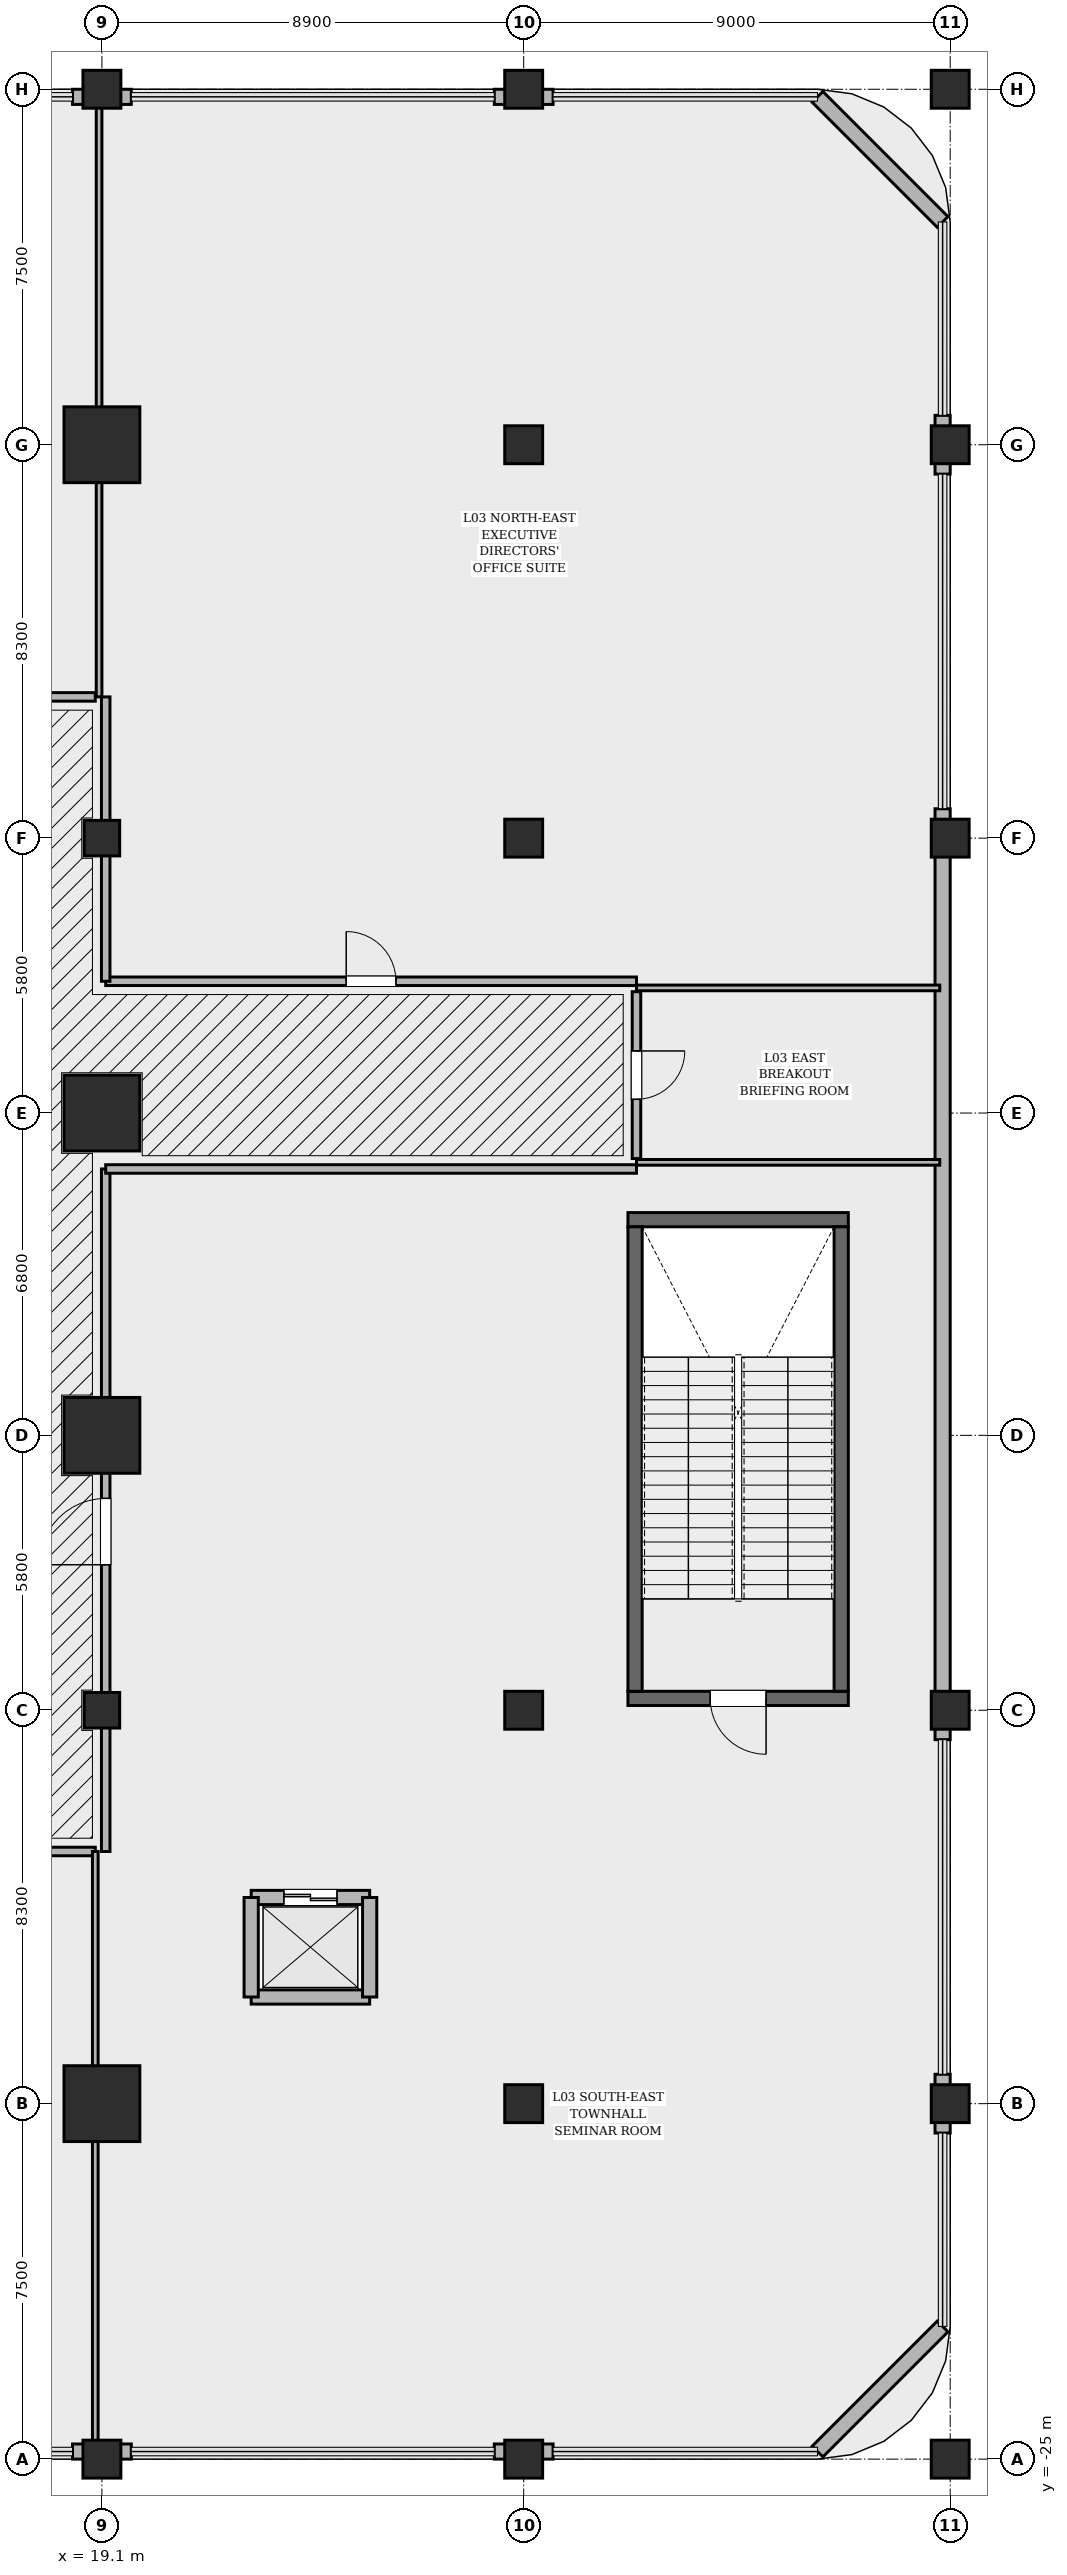
"""IFC4 building model, lengths in metres.
Left out: names, types, materials, properties, quantities, classifications, styles, units other than length and angle.
Written with IfcOpenShell. Run it as: python <this file> out.ifc"""

import sys

from ifc_helpers import new_model, si_unit, direction, frame, frame_2d, origin, origin_2d, place, context, subcontext, project, spatial, rectangle, hollow_rectangle, circle, extrude, element, fill, save


model = new_model("IFC4")
c1 = context("Model", 3, precision=1e-05, world=origin(), true_north=direction((0.0, 1.0)))
c2 = subcontext(c1, "Body", "Model", "MODEL_VIEW")
j1 = project(units=[si_unit("LENGTHUNIT", "METRE"), si_unit("PLANEANGLEUNIT", "RADIAN")], contexts=[c1])
p1 = place(None, origin())
s1 = spatial("IfcSite", under=j1, at=p1, CompositionType="ELEMENT")
p2 = place(p1, origin())
s2 = spatial("IfcBuilding", under=s1, at=p2, CompositionType="ELEMENT")
p3 = place(p2, frame((0.0, 0.0, 16.8)))
s3 = spatial("IfcBuildingStorey", under=s2, at=p3, CompositionType="ELEMENT", Elevation=16.8)
p4 = place(p3, frame((30.2, -8.95, 0.0), z_axis=(0.0, 0.0, 1.0), x_axis=(1.0, 0.0, 0.0)))
e1 = element("IfcWall", 1, at=p4, inside=s3, PredefinedType="SOLIDWALL", context=c2, shape_type="SweptSolid", body=[
    extrude(rectangle(XDim=4.65, YDim=0.3, at=frame_2d((2.325, 0.0))), origin(), (0.0, 0.0, 1.0), 5.4),
])
p5 = place(p4, frame((1.735, 0.0, 0.0)))
e2 = element("IfcOpeningElement", 2, at=p5, cuts=e1, PredefinedType="OPENING", context=c2, shape_type="SweptSolid", body=[
    extrude(rectangle(XDim=1.18, YDim=2.2, at=frame_2d((0.59, 1.1))), frame((0.0, 0.16, 0.0), z_axis=(0.0, -1.0, 0.0), x_axis=(1.0, 0.0, 0.0)), (0.0, 0.0, 1.0), 0.32),
])
p6 = place(p3, frame((34.85, 1.15, 0.0), z_axis=(0.0, 0.0, 1.0), x_axis=(-1.0, 0.0, 0.0)))
e3 = element("IfcWall", 3, at=p6, inside=s3, PredefinedType="SOLIDWALL", context=c2, shape_type="SweptSolid", body=[
    extrude(rectangle(XDim=4.65, YDim=0.3, at=frame_2d((2.325, 0.0))), origin(), (0.0, 0.0, 1.0), 5.4),
])
for number, where, z_axis, x_axis in (
    (4, (30.35, -8.8, 0.0), (0.0, 0.0, 1.0), (0.0, 1.0, 0.0)),
    (5, (34.7, 1.0, 0.0), (0.0, 0.0, 1.0), (0.0, -1.0, 0.0)),
):
    element("IfcWall", number, at=place(p3, frame(where, z_axis=z_axis, x_axis=x_axis)), inside=s3, PredefinedType="SOLIDWALL", context=c2, shape_type="SweptSolid", body=[
        extrude(rectangle(XDim=9.8, YDim=0.3, at=frame_2d((4.9, 0.0))), origin(), (0.0, 0.0, 1.0), 5.4),
    ])
for number, where, z_axis, x_axis in (
    (6, (19.1, -17.5, 0.0), (0.0, 0.0, 1.0), (1.0, 0.0, 0.0)),
    (7, (19.1, -3.4, 0.0), (0.0, 0.0, 1.0), (1.0, 0.0, 0.0)),
    (8, (19.1, 3.4, 0.0), (0.0, 0.0, 1.0), (1.0, 0.0, 0.0)),
    (9, (19.1, 17.5, 0.0), (0.0, 0.0, 1.0), (1.0, 0.0, 0.0)),
):
    element("IfcColumn", number, at=place(p3, frame(where, z_axis=z_axis, x_axis=x_axis)), inside=s3, PredefinedType="COLUMN", context=c2, shape_type="SweptSolid", body=[
        extrude(hollow_rectangle(XDim=1.6, YDim=1.6, WallThickness=0.05, at=origin_2d()), origin(), (0.0, 0.0, 1.0), 5.4),
    ])
for number, where, z_axis, x_axis in (
    (10, (19.1, -25.0, 0.0), (0.0, 0.0, 1.0), (1.0, 0.0, 0.0)),
    (11, (28.0, -25.0, 0.0), (0.0, 0.0, 1.0), (1.0, 0.0, 0.0)),
    (12, (37.0, -25.0, 0.0), (0.0, 0.0, 1.0), (1.0, 0.0, 0.0)),
    (13, (28.0, -17.5, 0.0), (0.0, 0.0, 1.0), (1.0, 0.0, 0.0)),
    (14, (37.0, -17.5, 0.0), (0.0, 0.0, 1.0), (1.0, 0.0, 0.0)),
    (15, (37.0, -9.2, 0.0), (0.0, 0.0, 1.0), (1.0, 0.0, 0.0)),
    (16, (37.0, 9.2, 0.0), (0.0, 0.0, 1.0), (1.0, 0.0, 0.0)),
    (17, (28.0, 17.5, 0.0), (0.0, 0.0, 1.0), (1.0, 0.0, 0.0)),
    (18, (37.0, 17.5, 0.0), (0.0, 0.0, 1.0), (1.0, 0.0, 0.0)),
    (19, (19.1, 25.0, 0.0), (0.0, 0.0, 1.0), (1.0, 0.0, 0.0)),
    (20, (28.0, 25.0, 0.0), (0.0, 0.0, 1.0), (1.0, 0.0, 0.0)),
    (21, (37.0, 25.0, 0.0), (0.0, 0.0, 1.0), (1.0, 0.0, 0.0)),
    (22, (28.0, -9.2, 0.0), (0.0, 0.0, 1.0), (1.0, 0.0, 0.0)),
    (23, (28.0, 9.2, 0.0), (0.0, 0.0, 1.0), (1.0, 0.0, 0.0)),
):
    element("IfcColumn", number, at=place(p3, frame(where, z_axis=z_axis, x_axis=x_axis)), inside=s3, PredefinedType="COLUMN", context=c2, shape_type="SweptSolid", body=[
        extrude(rectangle(XDim=0.8, YDim=0.8, at=origin_2d()), origin(), (0.0, 0.0, 1.0), 5.4),
    ])
for number, where, z_axis, x_axis in (
    (24, (19.1, -9.2, 0.0), (0.0, 0.0, 1.0), (1.0, 0.0, 0.0)),
    (25, (19.1, 9.2, 0.0), (0.0, 0.0, 1.0), (1.0, 0.0, 0.0)),
):
    element("IfcColumn", number, at=place(p3, frame(where, z_axis=z_axis, x_axis=x_axis)), inside=s3, PredefinedType="PILASTER", context=c2, shape_type="SweptSolid", body=[
        extrude(circle(Radius=0.375, at=origin_2d()), origin(), (0.0, 0.0, 1.0), 5.4),
    ])
for number, where, z_axis, x_axis in (
    (26, (18.48, -24.84, 0.0), (0.0, 0.0, 1.0), (1.0, 0.0, 0.0)),
    (27, (19.72, 24.84, 0.0), (0.0, 0.0, 1.0), (-1.0, 0.0, 0.0)),
):
    element("IfcWall", number, at=place(p3, frame(where, z_axis=z_axis, x_axis=x_axis)), inside=s3, PredefinedType="SOLIDWALL", context=c2, shape_type="SweptSolid", body=[
        extrude(rectangle(XDim=1.24, YDim=0.32, at=frame_2d((0.62, 0.0))), origin(), (0.0, 0.0, 1.0), 4.314),
    ])
for number, where, z_axis, x_axis in (
    (28, (27.38, -24.84, 0.0), (0.0, 0.0, 1.0), (1.0, 0.0, 0.0)),
    (29, (28.62, 24.84, 0.0), (0.0, 0.0, 1.0), (-1.0, 0.0, 0.0)),
):
    element("IfcWall", number, at=place(p3, frame(where, z_axis=z_axis, x_axis=x_axis)), inside=s3, PredefinedType="SOLIDWALL", context=c2, shape_type="SweptSolid", body=[
        extrude(rectangle(XDim=1.24, YDim=0.32, at=frame_2d((0.62, 0.0))), origin(), (0.0, 0.0, 1.0), 4.314),
    ])
p7 = place(p3, frame((36.84, 9.82, 0.0), z_axis=(0.0, 0.0, 1.0), x_axis=(0.0, -1.0, 0.0)))
e30 = element("IfcWall", 30, at=p7, inside=s3, PredefinedType="SOLIDWALL", context=c2, shape_type="SweptSolid", body=[
    extrude(rectangle(XDim=19.64, YDim=0.32, at=frame_2d((9.82, 0.0))), origin(), (0.0, 0.0, 1.0), 4.314),
])
for number, where, z_axis, x_axis in (
    (31, (36.84, -16.88, 0.0), (0.0, 0.0, 1.0), (0.0, -1.0, 0.0)),
    (32, (36.84, 18.12, 0.0), (0.0, 0.0, 1.0), (0.0, -1.0, 0.0)),
):
    element("IfcWall", number, at=place(p3, frame(where, z_axis=z_axis, x_axis=x_axis)), inside=s3, PredefinedType="SOLIDWALL", context=c2, shape_type="SweptSolid", body=[
        extrude(rectangle(XDim=1.24, YDim=0.32, at=frame_2d((0.62, 0.0))), origin(), (0.0, 0.0, 1.0), 4.314),
    ])
for number, where, z_axis, x_axis in (
    (33, (34.2, 24.84, 0.0), (0.0, 0.0, 1.0), (0.707, -0.707, 0.0)),
    (34, (36.84, -22.2, 0.0), (0.0, 0.0, 1.0), (-0.707, -0.707, 0.0)),
):
    element("IfcWall", number, at=place(p3, frame(where, z_axis=z_axis, x_axis=x_axis)), inside=s3, PredefinedType="SOLIDWALL", context=c2, shape_type="SweptSolid", body=[
        extrude(rectangle(XDim=3.734, YDim=0.32, at=frame_2d((1.867, 0.0))), origin(), (0.0, 0.0, 1.0), 4.464),
    ])
p8 = place(p3, frame((22.25, -13.15, 0.0), z_axis=(0.0, 0.0, 1.0), x_axis=(1.0, 0.0, 0.0)))
e35 = element("IfcWall", 35, at=p8, inside=s3, PredefinedType="SOLIDWALL", context=c2, shape_type="SweptSolid", body=[
    extrude(rectangle(XDim=2.5, YDim=0.3, at=frame_2d((1.25, 0.0))), origin(), (0.0, 0.0, 1.0), 5.02),
])
p9 = place(p8, frame((0.69, 0.0, 0.0)))
e36 = element("IfcOpeningElement", 36, at=p9, cuts=e35, PredefinedType="OPENING", context=c2, shape_type="SweptSolid", body=[
    extrude(rectangle(XDim=1.12, YDim=2.25, at=frame_2d((0.56, 1.125))), frame((0.0, 0.16, 0.0), z_axis=(0.0, -1.0, 0.0), x_axis=(1.0, 0.0, 0.0)), (0.0, 0.0, 1.0), 0.32),
])
p10 = place(p3, frame((22.25, -15.25, 0.0), z_axis=(0.0, 0.0, 1.0), x_axis=(1.0, 0.0, 0.0)))
e37 = element("IfcWall", 37, at=p10, inside=s3, PredefinedType="SOLIDWALL", context=c2, shape_type="SweptSolid", body=[
    extrude(rectangle(XDim=2.5, YDim=0.3, at=frame_2d((1.25, 0.0))), origin(), (0.0, 0.0, 1.0), 5.02),
])
for number, where, z_axis, x_axis in (
    (38, (22.25, -15.25, 0.0), (0.0, 0.0, 1.0), (0.0, 1.0, 0.0)),
    (39, (24.75, -15.25, 0.0), (0.0, 0.0, 1.0), (0.0, 1.0, 0.0)),
):
    element("IfcWall", number, at=place(p3, frame(where, z_axis=z_axis, x_axis=x_axis)), inside=s3, PredefinedType="SOLIDWALL", context=c2, shape_type="SweptSolid", body=[
        extrude(rectangle(XDim=2.1, YDim=0.3, at=frame_2d((1.05, 0.0))), origin(), (0.0, 0.0, 1.0), 5.02),
    ])
p11 = place(p3, frame((-18.96, -12.18, 0.0), z_axis=(0.0, 0.0, 1.0), x_axis=(1.0, 0.0, 0.0)))
e40 = element("IfcWall", 40, at=p11, inside=s3, PredefinedType="PARTITIONING", context=c2, shape_type="SweptSolid", body=[
    extrude(rectangle(XDim=37.92, YDim=0.18, at=frame_2d((18.96, 0.0))), origin(), (0.0, 0.0, 1.0), 4.314),
])
p12 = place(p11, frame((18.435, 0.0, 0.0)))
e41 = element("IfcOpeningElement", 41, at=p12, cuts=e40, PredefinedType="OPENING", context=c2, shape_type="SweptSolid", body=[
    extrude(rectangle(XDim=1.05, YDim=2.2, at=frame_2d((0.525, 1.1))), frame((0.0, 0.1, 0.0), z_axis=(0.0, -1.0, 0.0), x_axis=(1.0, 0.0, 0.0)), (0.0, 0.0, 1.0), 0.2),
])
p13 = place(p3, frame((18.96, -12.18, 0.0), z_axis=(0.0, 0.0, 1.0), x_axis=(0.0, -1.0, 0.0)))
e42 = element("IfcWall", 42, at=p13, inside=s3, PredefinedType="PARTITIONING", context=c2, shape_type="SweptSolid", body=[
    extrude(rectangle(XDim=12.6, YDim=0.12, at=frame_2d((6.3, 0.0))), origin(), (0.0, 0.0, 1.0), 4.314),
])
p14 = place(p3, frame((19.18, -12.18, 0.0), z_axis=(0.0, 0.0, 1.0), x_axis=(0.0, 1.0, 0.0)))
e43 = element("IfcWall", 43, at=p14, inside=s3, PredefinedType="PARTITIONING", context=c2, shape_type="SweptSolid", body=[
    extrude(rectangle(XDim=14.4, YDim=0.18, at=frame_2d((7.2, 0.0))), origin(), (0.0, 0.0, 1.0), 4.314),
])
p15 = place(p14, frame((6.05, 0.0, 0.0)))
e44 = element("IfcOpeningElement", 44, at=p15, cuts=e43, PredefinedType="OPENING", context=c2, shape_type="SweptSolid", body=[
    extrude(rectangle(XDim=1.4, YDim=2.25, at=frame_2d((0.7, 1.125))), frame((0.0, 0.1, 0.0), z_axis=(0.0, -1.0, 0.0), x_axis=(1.0, 0.0, 0.0)), (0.0, 0.0, 1.0), 0.2),
])
p16 = place(p3, frame((19.18, 2.22, 0.0), z_axis=(0.0, 0.0, 1.0), x_axis=(1.0, 0.0, 0.0)))
e45 = element("IfcWall", 45, at=p16, inside=s3, PredefinedType="PARTITIONING", context=c2, shape_type="SweptSolid", body=[
    extrude(rectangle(XDim=11.2, YDim=0.18, at=frame_2d((5.6, 0.0))), origin(), (0.0, 0.0, 1.0), 4.314),
])
for number, where, z_axis, x_axis in (
    (46, (30.38, 2.36, 0.0), (0.0, 0.0, 1.0), (1.0, 0.0, 0.0)),
    (47, (36.78, 6.04, 0.0), (0.0, 0.0, 1.0), (-1.0, 0.0, 0.0)),
):
    element("IfcWall", number, at=place(p3, frame(where, z_axis=z_axis, x_axis=x_axis)), inside=s3, PredefinedType="PARTITIONING", context=c2, shape_type="SweptSolid", body=[
        extrude(rectangle(XDim=6.4, YDim=0.12, at=frame_2d((3.2, 0.0))), origin(), (0.0, 0.0, 1.0), 5.02),
    ])
p17 = place(p3, frame((30.38, 6.18, 0.0), z_axis=(0.0, 0.0, 1.0), x_axis=(-1.0, 0.0, 0.0)))
e48 = element("IfcWall", 48, at=p17, inside=s3, PredefinedType="PARTITIONING", context=c2, shape_type="SweptSolid", body=[
    extrude(rectangle(XDim=11.2, YDim=0.18, at=frame_2d((5.6, 0.0))), origin(), (0.0, 0.0, 1.0), 4.314),
])
p18 = place(p17, frame((5.075, 0.0, 0.0)))
e49 = element("IfcOpeningElement", 49, at=p18, cuts=e48, PredefinedType="OPENING", context=c2, shape_type="SweptSolid", body=[
    extrude(rectangle(XDim=1.05, YDim=2.2, at=frame_2d((0.525, 1.1))), frame((0.0, 0.1, 0.0), z_axis=(0.0, -1.0, 0.0), x_axis=(1.0, 0.0, 0.0)), (0.0, 0.0, 1.0), 0.2),
])
p19 = place(p3, frame((19.18, 6.18, 0.0), z_axis=(0.0, 0.0, 1.0), x_axis=(0.0, 1.0, 0.0)))
e50 = element("IfcWall", 50, at=p19, inside=s3, PredefinedType="PARTITIONING", context=c2, shape_type="SweptSolid", body=[
    extrude(rectangle(XDim=6.0, YDim=0.18, at=frame_2d((3.0, 0.0))), origin(), (0.0, 0.0, 1.0), 4.314),
])
p20 = place(p3, frame((19.04, 12.18, 0.0), z_axis=(0.0, 0.0, 1.0), x_axis=(0.0, 1.0, 0.0)))
e51 = element("IfcWall", 51, at=p20, inside=s3, PredefinedType="PARTITIONING", context=c2, shape_type="SweptSolid", body=[
    extrude(rectangle(XDim=12.6, YDim=0.12, at=frame_2d((6.3, 0.0))), origin(), (0.0, 0.0, 1.0), 4.314),
])
p21 = place(p3, frame((18.96, 12.18, 0.0), z_axis=(0.0, 0.0, 1.0), x_axis=(-1.0, 0.0, 0.0)))
e52 = element("IfcWall", 52, at=p21, inside=s3, PredefinedType="PARTITIONING", context=c2, shape_type="SweptSolid", body=[
    extrude(rectangle(XDim=16.78, YDim=0.18, at=frame_2d((8.39, 0.0))), origin(), (0.0, 0.0, 1.0), 4.314),
])
p22 = place(p21, frame((7.865, 0.0, 0.0)))
e53 = element("IfcOpeningElement", 53, at=p22, cuts=e52, PredefinedType="OPENING", context=c2, shape_type="SweptSolid", body=[
    extrude(rectangle(XDim=1.05, YDim=2.2, at=frame_2d((0.525, 1.1))), frame((0.0, 0.1, 0.0), z_axis=(0.0, -1.0, 0.0), x_axis=(1.0, 0.0, 0.0)), (0.0, 0.0, 1.0), 0.2),
])
p23 = place(p3, frame((30.38, 2.44, 0.0), z_axis=(0.0, 0.0, 1.0), x_axis=(0.0, 1.0, 0.0)))
e54 = element("IfcWall", 54, at=p23, inside=s3, PredefinedType="PARTITIONING", context=c2, shape_type="SweptSolid", body=[
    extrude(rectangle(XDim=3.52, YDim=0.18, at=frame_2d((1.76, 0.0))), origin(), (0.0, 0.0, 1.0), 4.564),
])
p24 = place(p23, frame((1.25, 0.0, 0.0)))
e55 = element("IfcOpeningElement", 55, at=p24, cuts=e54, PredefinedType="OPENING", context=c2, shape_type="SweptSolid", body=[
    extrude(rectangle(XDim=1.02, YDim=2.2, at=frame_2d((0.51, 1.1))), frame((0.0, 0.1, 0.0), z_axis=(0.0, -1.0, 0.0), x_axis=(1.0, 0.0, 0.0)), (0.0, 0.0, 1.0), 0.2),
])
p25 = place(p5, origin())
e56 = element("IfcDoor", 56, at=p25, inside=s3, OperationType="SINGLE_SWING_RIGHT", PredefinedType="DOOR", context=c2, shape_type="SweptSolid", body=[
    extrude(rectangle(XDim=1.18, YDim=2.2, at=frame_2d((0.59, 1.1))), frame((0.0, 0.025, 0.0), z_axis=(0.0, -1.0, 0.0), x_axis=(1.0, 0.0, 0.0)), (0.0, 0.0, 1.0), 0.05),
])
fill(e2, e56)
p26 = place(p9, origin())
e57 = element("IfcDoor", 57, at=p26, inside=s3, OperationType="DOUBLE_DOOR_SLIDING", PredefinedType="DOOR", context=c2, shape_type="SweptSolid", body=[
    extrude(rectangle(XDim=1.12, YDim=2.25, at=frame_2d((0.56, 1.125))), frame((0.0, 0.025, 0.0), z_axis=(0.0, -1.0, 0.0), x_axis=(1.0, 0.0, 0.0)), (0.0, 0.0, 1.0), 0.05),
])
fill(e36, e57)
p27 = place(p15, origin())
e58 = element("IfcDoor", 58, at=p27, inside=s3, OperationType="SINGLE_SWING_LEFT", PredefinedType="DOOR", context=c2, shape_type="SweptSolid", body=[
    extrude(rectangle(XDim=1.4, YDim=2.25, at=frame_2d((0.7, 1.125))), frame((0.0, 0.025, 0.0), z_axis=(0.0, -1.0, 0.0), x_axis=(1.0, 0.0, 0.0)), (0.0, 0.0, 1.0), 0.05),
])
fill(e44, e58)
p28 = place(p18, origin())
e59 = element("IfcDoor", 59, at=p28, inside=s3, OperationType="SINGLE_SWING_RIGHT", PredefinedType="DOOR", context=c2, shape_type="SweptSolid", body=[
    extrude(rectangle(XDim=1.05, YDim=2.2, at=frame_2d((0.525, 1.1))), frame((0.0, 0.025, 0.0), z_axis=(0.0, -1.0, 0.0), x_axis=(1.0, 0.0, 0.0)), (0.0, 0.0, 1.0), 0.05),
])
fill(e49, e59)
p29 = place(p24, origin())
e60 = element("IfcDoor", 60, at=p29, inside=s3, OperationType="SINGLE_SWING_RIGHT", PredefinedType="DOOR", context=c2, shape_type="SweptSolid", body=[
    extrude(rectangle(XDim=1.02, YDim=2.2, at=frame_2d((0.51, 1.1))), frame((0.0, 0.025, 0.0), z_axis=(0.0, -1.0, 0.0), x_axis=(1.0, 0.0, 0.0)), (0.0, 0.0, 1.0), 0.05),
])
fill(e55, e60)
save(model, sys.argv[1])
